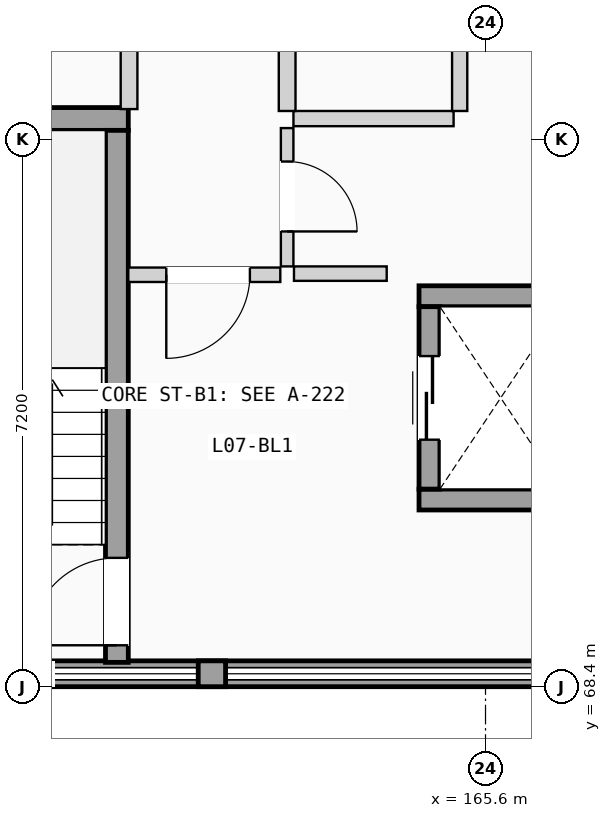
"""IFC4 building model, lengths in metres.
Left out: names, types, materials, properties, quantities, classifications, styles, units other than length and angle.
Written with IfcOpenShell. Run it as: python <this file> out.ifc"""

import sys

from ifc_helpers import new_model, si_unit, direction, frame, frame_2d, origin, place, context, subcontext, project, spatial, rectangle, extrude, element, fill, save


model = new_model("IFC4")
c1 = context("Model", 3, precision=1e-05, world=origin(), true_north=direction((0.0, 1.0)))
c2 = subcontext(c1, "Body", "Model", "MODEL_VIEW")
j1 = project(units=[si_unit("LENGTHUNIT", "METRE"), si_unit("PLANEANGLEUNIT", "RADIAN")], contexts=[c1])
p1 = place(None, origin())
s1 = spatial("IfcSite", under=j1, at=p1, CompositionType="ELEMENT")
p2 = place(p1, origin())
s2 = spatial("IfcBuilding", under=s1, at=p2, CompositionType="ELEMENT")
p3 = place(p2, frame((0.0, 0.0, 24.675)))
s3 = spatial("IfcBuildingStorey", under=s2, at=p3, CompositionType="ELEMENT", Elevation=24.675)
p4 = place(p3, frame((151.2, 68.57, 0.0), z_axis=(0.0, 0.0, 1.0), x_axis=(1.0, 0.0, 0.0)))
e1 = element("IfcWall", 1, at=p4, inside=s3, PredefinedType="SOLIDWALL", context=c2, shape_type="SweptSolid", body=[
    extrude(rectangle(XDim=21.6, YDim=0.34, at=frame_2d((10.8, 0.0))), origin(), (0.0, 0.0, 1.0), 1.11),
])
p5 = place(p3, frame((161.82, 68.57, 1.11), z_axis=(0.0, 0.0, 1.0), x_axis=(1.0, 0.0, 0.0)))
e2 = element("IfcWall", 2, at=p5, inside=s3, PredefinedType="SOLIDWALL", context=c2, shape_type="SweptSolid", body=[
    extrude(rectangle(XDim=0.36, YDim=0.34, at=frame_2d((0.18, 0.0))), origin(), (0.0, 0.0, 1.0), 1.79),
])
p6 = place(p3, frame((156.9, 75.87, 0.0), z_axis=(0.0, 0.0, 1.0), x_axis=(1.0, 0.0, 0.0)))
e3 = element("IfcWall", 3, at=p6, inside=s3, PredefinedType="SHEAR", context=c2, shape_type="SweptSolid", body=[
    extrude(rectangle(XDim=4.0, YDim=0.3, at=frame_2d((2.0, 0.0))), origin(), (0.0, 0.0, 1.0), 2.9),
])
p7 = place(p3, frame((160.75, 68.72, 0.0), z_axis=(0.0, 0.0, 1.0), x_axis=(0.0, 1.0, 0.0)))
e4 = element("IfcWall", 4, at=p7, inside=s3, PredefinedType="SHEAR", context=c2, shape_type="SweptSolid", body=[
    extrude(rectangle(XDim=7.0, YDim=0.3, at=frame_2d((3.5, 0.0))), origin(), (0.0, 0.0, 1.0), 2.9),
])
p8 = place(p7, frame((0.225, 0.0, 0.0)))
e5 = element("IfcOpeningElement", 5, at=p8, cuts=e4, PredefinedType="OPENING", context=c2, shape_type="SweptSolid", body=[
    extrude(rectangle(XDim=1.15, YDim=2.12, at=frame_2d((0.575, 1.06))), frame((0.0, 0.16, 0.0), z_axis=(0.0, -1.0, 0.0), x_axis=(1.0, 0.0, 0.0)), (0.0, 0.0, 1.0), 0.32),
])
for number, where, z_axis, x_axis in (
    (6, (164.725, 70.863, 0.0), (0.0, 0.0, 1.0), (1.0, 0.0, 0.0)),
    (7, (164.725, 73.538, 0.0), (0.0, 0.0, 1.0), (1.0, 0.0, 0.0)),
):
    element("IfcWall", number, at=place(p3, frame(where, z_axis=z_axis, x_axis=x_axis)), inside=s3, PredefinedType="SHEAR", context=c2, shape_type="SweptSolid", body=[
        extrude(rectangle(XDim=2.15, YDim=0.275, at=frame_2d((1.075, 0.0))), origin(), (0.0, 0.0, 1.0), 2.9),
    ])
p9 = place(p3, frame((164.863, 71.0, 0.0), z_axis=(0.0, 0.0, 1.0), x_axis=(0.0, 1.0, 0.0)))
e8 = element("IfcWall", 8, at=p9, inside=s3, PredefinedType="SHEAR", context=c2, shape_type="SweptSolid", body=[
    extrude(rectangle(XDim=2.4, YDim=0.275, at=frame_2d((1.2, 0.0))), origin(), (0.0, 0.0, 1.0), 2.9),
])
p10 = place(p9, frame((0.65, 0.0, 0.0)))
e9 = element("IfcOpeningElement", 9, at=p10, cuts=e8, PredefinedType="OPENING", context=c2, shape_type="SweptSolid", body=[
    extrude(rectangle(XDim=1.1, YDim=2.15, at=frame_2d((0.55, 1.075))), frame((0.0, 0.147, 0.0), z_axis=(0.0, -1.0, 0.0), x_axis=(1.0, 0.0, 0.0)), (0.0, 0.0, 1.0), 0.295),
])
p11 = place(p3, frame((163.08, 73.835, 0.0), z_axis=(0.0, 0.0, 1.0), x_axis=(1.0, 0.0, 0.0)))
e10 = element("IfcWall", 10, at=p11, inside=s3, PredefinedType="PARTITIONING", context=c2, shape_type="SweptSolid", body=[
    extrude(rectangle(XDim=1.22, YDim=0.19, at=frame_2d((0.61, 0.0))), origin(), (0.0, 0.0, 1.0), 2.87),
])
p12 = place(p3, frame((160.9, 73.82, 0.0), z_axis=(0.0, 0.0, 1.0), x_axis=(1.0, 0.0, 0.0)))
e11 = element("IfcWall", 11, at=p12, inside=s3, PredefinedType="PARTITIONING", context=c2, shape_type="SweptSolid", body=[
    extrude(rectangle(XDim=2.0, YDim=0.19, at=frame_2d((1.0, 0.0))), origin(), (0.0, 0.0, 1.0), 2.87),
])
p13 = place(p12, frame((0.5, 0.0, 0.0)))
e12 = element("IfcOpeningElement", 12, at=p13, cuts=e11, PredefinedType="OPENING", context=c2, shape_type="SweptSolid", body=[
    extrude(rectangle(XDim=1.1, YDim=2.12, at=frame_2d((0.55, 1.06))), frame((0.0, 0.105, 0.0), z_axis=(0.0, -1.0, 0.0), x_axis=(1.0, 0.0, 0.0)), (0.0, 0.0, 1.0), 0.21),
])
p14 = place(p3, frame((162.99, 73.93, 0.0), z_axis=(0.0, 0.0, 1.0), x_axis=(0.0, 1.0, 0.0)))
e13 = element("IfcWall", 13, at=p14, inside=s3, PredefinedType="PARTITIONING", context=c2, shape_type="SweptSolid", body=[
    extrude(rectangle(XDim=1.82, YDim=0.165, at=frame_2d((0.91, 0.0))), origin(), (0.0, 0.0, 1.0), 2.87),
])
p15 = place(p14, frame((0.46, 0.0, 0.0)))
e14 = element("IfcOpeningElement", 14, at=p15, cuts=e13, PredefinedType="OPENING", context=c2, shape_type="SweptSolid", body=[
    extrude(rectangle(XDim=0.92, YDim=2.04, at=frame_2d((0.46, 1.02))), frame((0.0, 0.093, 0.0), z_axis=(0.0, -1.0, 0.0), x_axis=(1.0, 0.0, 0.0)), (0.0, 0.0, 1.0), 0.185),
])
p16 = place(p3, frame((163.073, 75.875, 0.0), z_axis=(0.0, 0.0, 1.0), x_axis=(1.0, 0.0, 0.0)))
e15 = element("IfcWall", 15, at=p16, inside=s3, PredefinedType="PLUMBINGWALL", context=c2, shape_type="SweptSolid", body=[
    extrude(rectangle(XDim=2.107, YDim=0.2, at=frame_2d((1.053, 0.0))), origin(), (0.0, 0.0, 1.0), 2.87),
])
p17 = place(p3, frame((160.91, 76.0, 0.0), z_axis=(0.0, 0.0, 1.0), x_axis=(0.0, 1.0, 0.0)))
e16 = element("IfcWall", 16, at=p17, inside=s3, PredefinedType="PLUMBINGWALL", context=c2, shape_type="SweptSolid", body=[
    extrude(rectangle(XDim=4.475, YDim=0.22, at=frame_2d((2.238, 0.0))), origin(), (0.0, 0.0, 1.0), 2.87),
])
p18 = place(p3, frame((162.99, 75.975, 0.0), z_axis=(0.0, 0.0, 1.0), x_axis=(0.0, 1.0, 0.0)))
e17 = element("IfcWall", 17, at=p18, inside=s3, PredefinedType="PLUMBINGWALL", context=c2, shape_type="SweptSolid", body=[
    extrude(rectangle(XDim=4.5, YDim=0.22, at=frame_2d((2.25, 0.0))), origin(), (0.0, 0.0, 1.0), 2.87),
])
p19 = place(p3, frame((165.26, 75.975, 0.0), z_axis=(0.0, 0.0, 1.0), x_axis=(0.0, 1.0, 0.0)))
e18 = element("IfcWall", 18, at=p19, inside=s3, PredefinedType="PLUMBINGWALL", context=c2, shape_type="SweptSolid", body=[
    extrude(rectangle(XDim=4.505, YDim=0.2, at=frame_2d((2.252, 0.0))), origin(), (0.0, 0.0, 1.0), 2.87),
])
p20 = place(p8, origin())
e19 = element("IfcDoor", 19, at=p20, inside=s3, OperationType="SINGLE_SWING_LEFT", PredefinedType="DOOR", context=c2, shape_type="SweptSolid", body=[
    extrude(rectangle(XDim=1.15, YDim=2.12, at=frame_2d((0.575, 1.06))), frame((0.0, 0.025, 0.0), z_axis=(0.0, -1.0, 0.0), x_axis=(1.0, 0.0, 0.0)), (0.0, 0.0, 1.0), 0.05),
])
fill(e5, e19)
p21 = place(p10, origin())
e20 = element("IfcDoor", 20, at=p21, inside=s3, OperationType="SLIDING_TO_LEFT", PredefinedType="DOOR", context=c2, shape_type="SweptSolid", body=[
    extrude(rectangle(XDim=1.1, YDim=2.15, at=frame_2d((0.55, 1.075))), frame((0.0, 0.025, 0.0), z_axis=(0.0, -1.0, 0.0), x_axis=(1.0, 0.0, 0.0)), (0.0, 0.0, 1.0), 0.05),
])
fill(e9, e20)
p22 = place(p13, frame((1.1, 0.0, 0.0), z_axis=(0.0, 0.0, 1.0), x_axis=(-1.0, 0.0, 0.0)))
e21 = element("IfcDoor", 21, at=p22, inside=s3, OperationType="SINGLE_SWING_LEFT", PredefinedType="DOOR", context=c2, shape_type="SweptSolid", body=[
    extrude(rectangle(XDim=1.1, YDim=2.12, at=frame_2d((0.55, 1.06))), frame((0.0, 0.025, 0.0), z_axis=(0.0, -1.0, 0.0), x_axis=(1.0, 0.0, 0.0)), (0.0, 0.0, 1.0), 0.05),
])
fill(e12, e21)
p23 = place(p15, frame((0.92, 0.0, 0.0), z_axis=(0.0, 0.0, 1.0), x_axis=(-1.0, 0.0, 0.0)))
e22 = element("IfcDoor", 22, at=p23, inside=s3, OperationType="SINGLE_SWING_LEFT", PredefinedType="DOOR", context=c2, shape_type="SweptSolid", body=[
    extrude(rectangle(XDim=0.92, YDim=2.04, at=frame_2d((0.46, 1.02))), frame((0.0, 0.025, 0.0), z_axis=(0.0, -1.0, 0.0), x_axis=(1.0, 0.0, 0.0)), (0.0, 0.0, 1.0), 0.05),
])
fill(e14, e22)
save(model, sys.argv[1])
